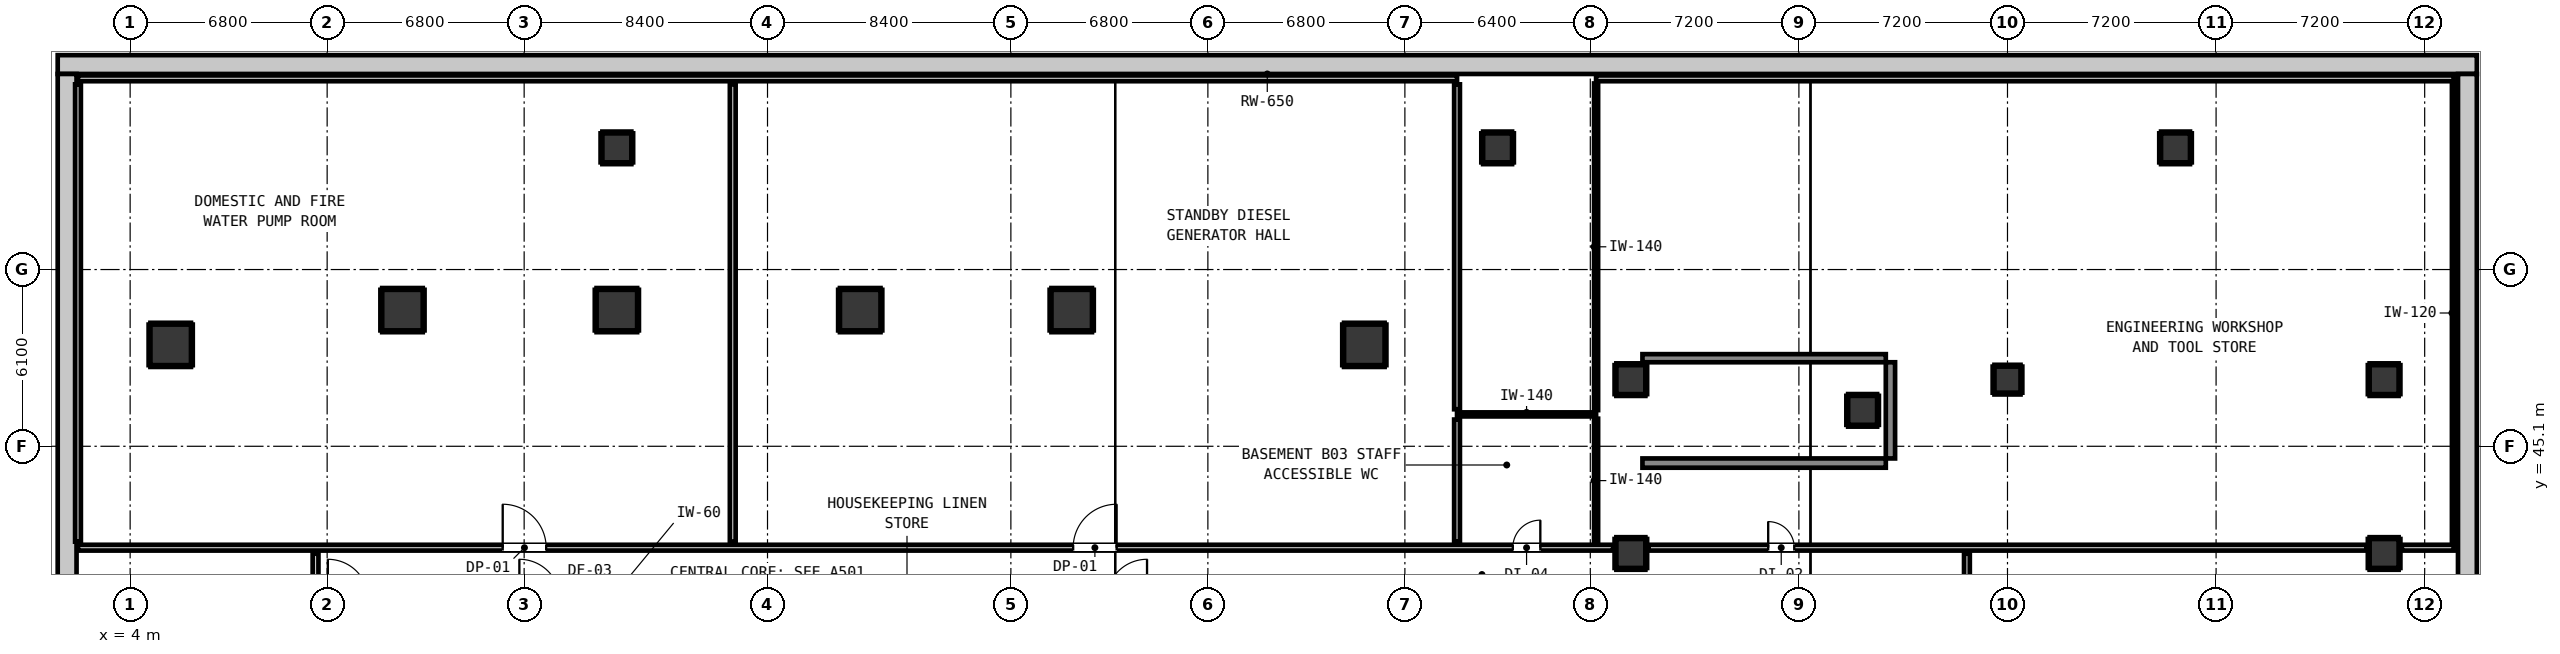
"""IFC4 building model, lengths in metres.
Left out: names, types, materials, properties, quantities, classifications, styles, units other than length and angle.
Written with IfcOpenShell. Run it as: python <this file> out.ifc"""

import sys

from ifc_helpers import new_model, si_unit, direction, frame, frame_2d, origin, origin_2d, place, context, subcontext, project, spatial, rectangle, circle, extrude, element, fill, save


model = new_model("IFC4")
c1 = context("Model", 3, precision=1e-05, world=origin(), true_north=direction((0.0, 1.0)))
c2 = subcontext(c1, "Body", "Model", "MODEL_VIEW")
j1 = project(units=[si_unit("LENGTHUNIT", "METRE"), si_unit("PLANEANGLEUNIT", "RADIAN")], contexts=[c1])
p1 = place(None, origin())
s1 = spatial("IfcSite", under=j1, at=p1, CompositionType="ELEMENT")
p2 = place(p1, origin())
s2 = spatial("IfcBuilding", under=s1, at=p2, CompositionType="ELEMENT")
p3 = place(p2, frame((0.0, 0.0, -13.2)))
s3 = spatial("IfcBuildingStorey", under=s2, at=p3, CompositionType="ELEMENT", Elevation=-13.2)
p4 = place(p3, frame((85.0, 58.275, 0.0), z_axis=(0.0, 0.0, 1.0), x_axis=(-1.0, 0.0, 0.0)))
e1 = element("IfcWall", 1, at=p4, inside=s3, PredefinedType="SOLIDWALL", context=c2, shape_type="SweptSolid", body=[
    extrude(rectangle(XDim=83.5, YDim=0.65, at=frame_2d((41.75, 0.0))), origin(), (0.0, 0.0, 1.0), 4.4),
])
for number, where, z_axis, x_axis in (
    (2, (1.825, 57.95, 0.0), (0.0, 0.0, 1.0), (0.0, -1.0, 0.0)),
    (3, (84.675, 2.65, 0.0), (0.0, 0.0, 1.0), (0.0, 1.0, 0.0)),
):
    element("IfcWall", number, at=place(p3, frame(where, z_axis=z_axis, x_axis=x_axis)), inside=s3, PredefinedType="SOLIDWALL", context=c2, shape_type="SweptSolid", body=[
        extrude(rectangle(XDim=55.3, YDim=0.65, at=frame_2d((27.65, 0.0))), origin(), (0.0, 0.0, 1.0), 4.4),
    ])
p5 = place(p3, frame((64.76, 44.68, 0.0), z_axis=(0.0, 0.0, 1.0), x_axis=(0.0, 1.0, 0.0)))
e4 = element("IfcWall", 4, at=p5, inside=s3, PredefinedType="SHEAR", context=c2, shape_type="SweptSolid", body=[
    extrude(rectangle(XDim=3.32, YDim=0.32, at=frame_2d((1.66, 0.0))), origin(), (0.0, 0.0, 1.0), 4.4),
])
p6 = place(p3, frame((56.2, 48.14, 0.0), z_axis=(0.0, 0.0, 1.0), x_axis=(1.0, 0.0, 0.0)))
e5 = element("IfcWall", 5, at=p6, inside=s3, PredefinedType="SHEAR", context=c2, shape_type="SweptSolid", body=[
    extrude(rectangle(XDim=8.4, YDim=0.28, at=frame_2d((4.2, 0.0))), origin(), (0.0, 0.0, 1.0), 4.4),
])
p7 = place(p3, frame((56.2, 44.52, 0.0), z_axis=(0.0, 0.0, 1.0), x_axis=(1.0, 0.0, 0.0)))
e6 = element("IfcWall", 6, at=p7, inside=s3, PredefinedType="SHEAR", context=c2, shape_type="SweptSolid", body=[
    extrude(rectangle(XDim=8.4, YDim=0.32, at=frame_2d((4.2, 0.0))), origin(), (0.0, 0.0, 1.0), 4.4),
])
for number, where, z_axis, x_axis in (
    (7, (13.4, 49.8, -0.4), (0.0, 0.0, 1.0), (1.0, 0.0, 0.0)),
    (8, (20.8, 49.8, -0.4), (0.0, 0.0, 1.0), (1.0, 0.0, 0.0)),
    (9, (29.2, 49.8, -0.4), (0.0, 0.0, 1.0), (1.0, 0.0, 0.0)),
    (10, (36.5, 49.8, -0.4), (0.0, 0.0, 1.0), (1.0, 0.0, 0.0)),
    (11, (5.4, 48.6, -0.4), (0.0, 0.0, 1.0), (1.0, 0.0, 0.0)),
    (12, (46.6, 48.6, -0.4), (0.0, 0.0, 1.0), (1.0, 0.0, 0.0)),
):
    element("IfcColumn", number, at=place(p3, frame(where, z_axis=z_axis, x_axis=x_axis)), inside=s3, PredefinedType="COLUMN", context=c2, shape_type="SweptSolid", body=[
        extrude(rectangle(XDim=1.4, YDim=1.4, at=origin_2d()), origin(), (0.0, 0.0, 1.0), 4.8),
    ])
for number, where, z_axis, x_axis in (
    (13, (20.8, 55.4, -0.4), (0.0, 0.0, 1.0), (1.0, 0.0, 0.0)),
    (14, (51.2, 55.4, -0.4), (0.0, 0.0, 1.0), (1.0, 0.0, 0.0)),
    (15, (74.6, 55.4, -0.4), (0.0, 0.0, 1.0), (1.0, 0.0, 0.0)),
    (16, (63.8, 46.34, -0.4), (0.0, 0.0, 1.0), (1.0, 0.0, 0.0)),
    (17, (55.8, 41.4, -0.4), (0.0, 0.0, 1.0), (1.0, 0.0, 0.0)),
    (18, (55.8, 47.4, -0.4), (0.0, 0.0, 1.0), (1.0, 0.0, 0.0)),
    (19, (81.8, 41.4, -0.4), (0.0, 0.0, 1.0), (1.0, 0.0, 0.0)),
    (20, (81.8, 47.4, -0.4), (0.0, 0.0, 1.0), (1.0, 0.0, 0.0)),
):
    element("IfcColumn", number, at=place(p3, frame(where, z_axis=z_axis, x_axis=x_axis)), inside=s3, PredefinedType="COLUMN", context=c2, shape_type="SweptSolid", body=[
        extrude(rectangle(XDim=1.0, YDim=1.0, at=origin_2d()), origin(), (0.0, 0.0, 1.0), 4.8),
    ])
p8 = place(p3, frame((68.8, 47.4, -0.4), z_axis=(0.0, 0.0, 1.0), x_axis=(1.0, 0.0, 0.0)))
e21 = element("IfcColumn", 21, at=p8, inside=s3, PredefinedType="COLUMN", context=c2, shape_type="SweptSolid", body=[
    extrude(circle(Radius=0.45, at=origin_2d()), origin(), (0.0, 0.0, 1.0), 4.8),
])
p9 = place(p3, frame((2.2, 41.6, 0.0), z_axis=(0.0, 0.0, 1.0), x_axis=(1.0, 0.0, 0.0)))
e22 = element("IfcWall", 22, at=p9, inside=s3, PredefinedType="PARTITIONING", context=c2, shape_type="SweptSolid", body=[
    extrude(rectangle(XDim=52.988, YDim=0.2, at=frame_2d((26.494, 0.0))), origin(), (0.0, 0.0, 1.0), 4.1),
])
p10 = place(p9, frame((14.66, 0.0, 0.0)))
e23 = element("IfcOpeningElement", 23, at=p10, cuts=e22, PredefinedType="OPENING", context=c2, shape_type="SweptSolid", body=[
    extrude(rectangle(XDim=1.5, YDim=2.15, at=frame_2d((0.75, 1.075))), frame((0.0, 0.11, 0.0), z_axis=(0.0, -1.0, 0.0), x_axis=(1.0, 0.0, 0.0)), (0.0, 0.0, 1.0), 0.22),
])
p11 = place(p9, frame((34.35, 0.0, 0.0)))
e24 = element("IfcOpeningElement", 24, at=p11, cuts=e22, PredefinedType="OPENING", context=c2, shape_type="SweptSolid", body=[
    extrude(rectangle(XDim=1.5, YDim=2.15, at=frame_2d((0.75, 1.075))), frame((0.0, 0.11, 0.0), z_axis=(0.0, -1.0, 0.0), x_axis=(1.0, 0.0, 0.0)), (0.0, 0.0, 1.0), 0.22),
])
p12 = place(p9, frame((49.525, 0.0, 0.0)))
e25 = element("IfcOpeningElement", 25, at=p12, cuts=e22, PredefinedType="OPENING", context=c2, shape_type="SweptSolid", body=[
    extrude(rectangle(XDim=0.95, YDim=2.1, at=frame_2d((0.475, 1.05))), frame((0.0, 0.11, 0.0), z_axis=(0.0, -1.0, 0.0), x_axis=(1.0, 0.0, 0.0)), (0.0, 0.0, 1.0), 0.22),
])
p13 = place(p3, frame((56.412, 41.6, 0.0), z_axis=(0.0, 0.0, 1.0), x_axis=(1.0, 0.0, 0.0)))
e26 = element("IfcWall", 26, at=p13, inside=s3, PredefinedType="PARTITIONING", context=c2, shape_type="SweptSolid", body=[
    extrude(rectangle(XDim=24.776, YDim=0.2, at=frame_2d((12.388, 0.0))), origin(), (0.0, 0.0, 1.0), 4.1),
])
p14 = place(p13, frame((4.128, 0.0, 0.0)))
e27 = element("IfcOpeningElement", 27, at=p14, cuts=e26, PredefinedType="OPENING", context=c2, shape_type="SweptSolid", body=[
    extrude(rectangle(XDim=0.9, YDim=2.1, at=frame_2d((0.45, 1.05))), frame((0.0, 0.11, 0.0), z_axis=(0.0, -1.0, 0.0), x_axis=(1.0, 0.0, 0.0)), (0.0, 0.0, 1.0), 0.22),
])
p15 = place(p3, frame((82.412, 41.6, 0.0), z_axis=(0.0, 0.0, 1.0), x_axis=(1.0, 0.0, 0.0)))
e28 = element("IfcWall", 28, at=p15, inside=s3, PredefinedType="PARTITIONING", context=c2, shape_type="SweptSolid", body=[
    extrude(rectangle(XDim=1.788, YDim=0.2, at=frame_2d((0.894, 0.0))), origin(), (0.0, 0.0, 1.0), 4.1),
])
p16 = place(p3, frame((2.2, 57.8, 0.0), z_axis=(0.0, 0.0, 1.0), x_axis=(1.0, 0.0, 0.0)))
e29 = element("IfcWall", 29, at=p16, inside=s3, PredefinedType="PARTITIONING", context=c2, shape_type="SweptSolid", body=[
    extrude(rectangle(XDim=47.6, YDim=0.2, at=frame_2d((23.8, 0.0))), origin(), (0.0, 0.0, 1.0), 4.1),
])
p17 = place(p3, frame((54.6, 57.8, 0.0), z_axis=(0.0, 0.0, 1.0), x_axis=(1.0, 0.0, 0.0)))
e30 = element("IfcWall", 30, at=p17, inside=s3, PredefinedType="PARTITIONING", context=c2, shape_type="SweptSolid", body=[
    extrude(rectangle(XDim=29.6, YDim=0.2, at=frame_2d((14.8, 0.0))), origin(), (0.0, 0.0, 1.0), 4.1),
])
p18 = place(p3, frame((49.8, 46.2, 0.0), z_axis=(0.0, 0.0, 1.0), x_axis=(1.0, 0.0, 0.0)))
e31 = element("IfcWall", 31, at=p18, inside=s3, PredefinedType="PARTITIONING", context=c2, shape_type="SweptSolid", body=[
    extrude(rectangle(XDim=4.8, YDim=0.14, at=frame_2d((2.4, 0.0))), origin(), (0.0, 0.0, 1.0), 4.1),
])
p19 = place(p3, frame((2.2, 41.808, 0.0), z_axis=(0.0, 0.0, 1.0), x_axis=(0.0, 1.0, 0.0)))
e32 = element("IfcWall", 32, at=p19, inside=s3, PredefinedType="PARTITIONING", context=c2, shape_type="SweptSolid", body=[
    extrude(rectangle(XDim=15.784, YDim=0.2, at=frame_2d((7.892, 0.0))), origin(), (0.0, 0.0, 1.0), 4.1),
])
p20 = place(p3, frame((10.4, 40.008, 0.0), z_axis=(0.0, 0.0, 1.0), x_axis=(0.0, 1.0, 0.0)))
e33 = element("IfcWall", 33, at=p20, inside=s3, PredefinedType="PARTITIONING", context=c2, shape_type="SweptSolid", body=[
    extrude(rectangle(XDim=1.384, YDim=0.2, at=frame_2d((0.692, 0.0))), origin(), (0.0, 0.0, 1.0), 4.1),
])
p21 = place(p3, frame((24.8, 41.808, 0.0), z_axis=(0.0, 0.0, 1.0), x_axis=(0.0, 1.0, 0.0)))
e34 = element("IfcWall", 34, at=p21, inside=s3, PredefinedType="PARTITIONING", context=c2, shape_type="SweptSolid", body=[
    extrude(rectangle(XDim=15.784, YDim=0.2, at=frame_2d((7.892, 0.0))), origin(), (0.0, 0.0, 1.0), 4.1),
])
p22 = place(p3, frame((49.8, 41.808, 0.0), z_axis=(0.0, 0.0, 1.0), x_axis=(0.0, 1.0, 0.0)))
e35 = element("IfcWall", 35, at=p22, inside=s3, PredefinedType="PARTITIONING", context=c2, shape_type="SweptSolid", body=[
    extrude(rectangle(XDim=4.214, YDim=0.2, at=frame_2d((2.107, 0.0))), origin(), (0.0, 0.0, 1.0), 4.1),
])
p23 = place(p3, frame((49.8, 46.378, 0.0), z_axis=(0.0, 0.0, 1.0), x_axis=(0.0, 1.0, 0.0)))
e36 = element("IfcWall", 36, at=p23, inside=s3, PredefinedType="PARTITIONING", context=c2, shape_type="SweptSolid", body=[
    extrude(rectangle(XDim=11.214, YDim=0.2, at=frame_2d((5.607, 0.0))), origin(), (0.0, 0.0, 1.0), 4.1),
])
p24 = place(p3, frame((67.4, 40.008, 0.0), z_axis=(0.0, 0.0, 1.0), x_axis=(0.0, 1.0, 0.0)))
e37 = element("IfcWall", 37, at=p24, inside=s3, PredefinedType="PARTITIONING", context=c2, shape_type="SweptSolid", body=[
    extrude(rectangle(XDim=1.384, YDim=0.2, at=frame_2d((0.692, 0.0))), origin(), (0.0, 0.0, 1.0), 4.1),
])
p25 = place(p3, frame((54.6, 41.778, 0.0), z_axis=(0.0, 0.0, 1.0), x_axis=(0.0, 1.0, 0.0)))
e38 = element("IfcWall", 38, at=p25, inside=s3, PredefinedType="PARTITIONING", context=c2, shape_type="SweptSolid", body=[
    extrude(rectangle(XDim=4.274, YDim=0.14, at=frame_2d((2.137, 0.0))), origin(), (0.0, 0.0, 1.0), 4.1),
])
p26 = place(p3, frame((54.6, 46.348, 0.0), z_axis=(0.0, 0.0, 1.0), x_axis=(0.0, 1.0, 0.0)))
e39 = element("IfcWall", 39, at=p26, inside=s3, PredefinedType="PARTITIONING", context=c2, shape_type="SweptSolid", body=[
    extrude(rectangle(XDim=11.274, YDim=0.14, at=frame_2d((5.637, 0.0))), origin(), (0.0, 0.0, 1.0), 4.1),
])
p27 = place(p3, frame((84.2, 41.768, 0.0), z_axis=(0.0, 0.0, 1.0), x_axis=(0.0, 1.0, 0.0)))
e40 = element("IfcWall", 40, at=p27, inside=s3, PredefinedType="PARTITIONING", context=c2, shape_type="SweptSolid", body=[
    extrude(rectangle(XDim=15.864, YDim=0.12, at=frame_2d((7.932, 0.0))), origin(), (0.0, 0.0, 1.0), 4.1),
])
for number, where, z_axis, x_axis in (
    (41, (12.7, 49.068, 0.0), (0.0, 0.0, 1.0), (1.0, 0.0, 0.0)),
    (42, (12.7, 50.532, 0.0), (0.0, 0.0, 1.0), (1.0, 0.0, 0.0)),
):
    element("IfcWall", number, at=place(p3, frame(where, z_axis=z_axis, x_axis=x_axis)), inside=s3, PredefinedType="PARTITIONING", context=c2, shape_type="SweptSolid", body=[
        extrude(rectangle(XDim=1.4, YDim=0.06, at=frame_2d((0.7, 0.0))), origin(), (0.0, 0.0, 1.0), 1.45),
    ])
for number, where, z_axis, x_axis in (
    (43, (12.668, 49.1, 0.0), (0.0, 0.0, 1.0), (0.0, 1.0, 0.0)),
    (44, (14.132, 49.1, 0.0), (0.0, 0.0, 1.0), (0.0, 1.0, 0.0)),
    (45, (20.1, 49.068, 0.0), (0.0, 0.0, 1.0), (1.0, 0.0, 0.0)),
    (46, (20.1, 50.532, 0.0), (0.0, 0.0, 1.0), (1.0, 0.0, 0.0)),
    (47, (20.068, 49.1, 0.0), (0.0, 0.0, 1.0), (0.0, 1.0, 0.0)),
    (48, (21.532, 49.1, 0.0), (0.0, 0.0, 1.0), (0.0, 1.0, 0.0)),
    (49, (28.5, 49.068, 0.0), (0.0, 0.0, 1.0), (1.0, 0.0, 0.0)),
    (50, (28.5, 50.532, 0.0), (0.0, 0.0, 1.0), (1.0, 0.0, 0.0)),
    (51, (28.468, 49.1, 0.0), (0.0, 0.0, 1.0), (0.0, 1.0, 0.0)),
    (52, (29.932, 49.1, 0.0), (0.0, 0.0, 1.0), (0.0, 1.0, 0.0)),
    (53, (35.8, 49.068, 0.0), (0.0, 0.0, 1.0), (1.0, 0.0, 0.0)),
    (54, (35.8, 50.532, 0.0), (0.0, 0.0, 1.0), (1.0, 0.0, 0.0)),
    (55, (35.768, 49.1, 0.0), (0.0, 0.0, 1.0), (0.0, 1.0, 0.0)),
    (56, (37.232, 49.1, 0.0), (0.0, 0.0, 1.0), (0.0, 1.0, 0.0)),
):
    element("IfcWall", number, at=place(p3, frame(where, z_axis=z_axis, x_axis=x_axis)), inside=s3, PredefinedType="PARTITIONING", context=c2, shape_type="SweptSolid", body=[
        extrude(rectangle(XDim=1.4, YDim=0.06, at=frame_2d((0.7, 0.0))), origin(), (0.0, 0.0, 1.0), 1.45),
    ])
for number, where, z_axis, x_axis in (
    (57, (4.7, 47.868, 0.0), (0.0, 0.0, 1.0), (1.0, 0.0, 0.0)),
    (58, (4.7, 49.332, 0.0), (0.0, 0.0, 1.0), (1.0, 0.0, 0.0)),
    (59, (4.668, 47.9, 0.0), (0.0, 0.0, 1.0), (0.0, 1.0, 0.0)),
    (60, (6.132, 47.9, 0.0), (0.0, 0.0, 1.0), (0.0, 1.0, 0.0)),
    (61, (45.9, 47.868, 0.0), (0.0, 0.0, 1.0), (1.0, 0.0, 0.0)),
    (62, (45.9, 49.332, 0.0), (0.0, 0.0, 1.0), (1.0, 0.0, 0.0)),
    (63, (45.868, 47.9, 0.0), (0.0, 0.0, 1.0), (0.0, 1.0, 0.0)),
    (64, (47.332, 47.9, 0.0), (0.0, 0.0, 1.0), (0.0, 1.0, 0.0)),
):
    element("IfcWall", number, at=place(p3, frame(where, z_axis=z_axis, x_axis=x_axis)), inside=s3, PredefinedType="PARTITIONING", context=c2, shape_type="SweptSolid", body=[
        extrude(rectangle(XDim=1.4, YDim=0.06, at=frame_2d((0.7, 0.0))), origin(), (0.0, 0.0, 1.0), 1.45),
    ])
for number, where, z_axis, x_axis in (
    (65, (20.3, 54.868, 0.0), (0.0, 0.0, 1.0), (1.0, 0.0, 0.0)),
    (66, (20.3, 55.932, 0.0), (0.0, 0.0, 1.0), (1.0, 0.0, 0.0)),
    (67, (20.268, 54.9, 0.0), (0.0, 0.0, 1.0), (0.0, 1.0, 0.0)),
    (68, (21.332, 54.9, 0.0), (0.0, 0.0, 1.0), (0.0, 1.0, 0.0)),
    (69, (50.7, 54.868, 0.0), (0.0, 0.0, 1.0), (1.0, 0.0, 0.0)),
    (70, (50.7, 55.932, 0.0), (0.0, 0.0, 1.0), (1.0, 0.0, 0.0)),
    (71, (50.668, 54.9, 0.0), (0.0, 0.0, 1.0), (0.0, 1.0, 0.0)),
    (72, (51.732, 54.9, 0.0), (0.0, 0.0, 1.0), (0.0, 1.0, 0.0)),
    (73, (74.1, 54.868, 0.0), (0.0, 0.0, 1.0), (1.0, 0.0, 0.0)),
    (74, (74.1, 55.932, 0.0), (0.0, 0.0, 1.0), (1.0, 0.0, 0.0)),
    (75, (74.068, 54.9, 0.0), (0.0, 0.0, 1.0), (0.0, 1.0, 0.0)),
    (76, (75.132, 54.9, 0.0), (0.0, 0.0, 1.0), (0.0, 1.0, 0.0)),
    (77, (63.3, 45.808, 0.0), (0.0, 0.0, 1.0), (1.0, 0.0, 0.0)),
    (78, (63.3, 46.872, 0.0), (0.0, 0.0, 1.0), (1.0, 0.0, 0.0)),
    (79, (63.268, 45.84, 0.0), (0.0, 0.0, 1.0), (0.0, 1.0, 0.0)),
    (80, (64.332, 45.84, 0.0), (0.0, 0.0, 1.0), (0.0, 1.0, 0.0)),
    (81, (55.3, 40.868, 0.0), (0.0, 0.0, 1.0), (1.0, 0.0, 0.0)),
    (82, (55.3, 41.932, 0.0), (0.0, 0.0, 1.0), (1.0, 0.0, 0.0)),
    (83, (55.268, 40.9, 0.0), (0.0, 0.0, 1.0), (0.0, 1.0, 0.0)),
    (84, (56.332, 40.9, 0.0), (0.0, 0.0, 1.0), (0.0, 1.0, 0.0)),
    (85, (55.3, 46.868, 0.0), (0.0, 0.0, 1.0), (1.0, 0.0, 0.0)),
    (86, (55.3, 47.932, 0.0), (0.0, 0.0, 1.0), (1.0, 0.0, 0.0)),
    (87, (55.268, 46.9, 0.0), (0.0, 0.0, 1.0), (0.0, 1.0, 0.0)),
    (88, (56.332, 46.9, 0.0), (0.0, 0.0, 1.0), (0.0, 1.0, 0.0)),
    (89, (81.3, 40.868, 0.0), (0.0, 0.0, 1.0), (1.0, 0.0, 0.0)),
    (90, (81.3, 41.932, 0.0), (0.0, 0.0, 1.0), (1.0, 0.0, 0.0)),
    (91, (81.268, 40.9, 0.0), (0.0, 0.0, 1.0), (0.0, 1.0, 0.0)),
    (92, (82.332, 40.9, 0.0), (0.0, 0.0, 1.0), (0.0, 1.0, 0.0)),
    (93, (81.3, 46.868, 0.0), (0.0, 0.0, 1.0), (1.0, 0.0, 0.0)),
    (94, (81.3, 47.932, 0.0), (0.0, 0.0, 1.0), (1.0, 0.0, 0.0)),
    (95, (81.268, 46.9, 0.0), (0.0, 0.0, 1.0), (0.0, 1.0, 0.0)),
    (96, (82.332, 46.9, 0.0), (0.0, 0.0, 1.0), (0.0, 1.0, 0.0)),
):
    element("IfcWall", number, at=place(p3, frame(where, z_axis=z_axis, x_axis=x_axis)), inside=s3, PredefinedType="PARTITIONING", context=c2, shape_type="SweptSolid", body=[
        extrude(rectangle(XDim=1.0, YDim=0.06, at=frame_2d((0.5, 0.0))), origin(), (0.0, 0.0, 1.0), 1.45),
    ])
for number, where, z_axis, x_axis in (
    (97, (68.35, 46.918, 0.0), (0.0, 0.0, 1.0), (1.0, 0.0, 0.0)),
    (98, (68.35, 47.882, 0.0), (0.0, 0.0, 1.0), (1.0, 0.0, 0.0)),
):
    element("IfcWall", number, at=place(p3, frame(where, z_axis=z_axis, x_axis=x_axis)), inside=s3, PredefinedType="PARTITIONING", context=c2, shape_type="SweptSolid", body=[
        extrude(rectangle(XDim=0.9, YDim=0.06, at=frame_2d((0.45, 0.0))), origin(), (0.0, 0.0, 1.0), 1.45),
    ])
for number, where, z_axis, x_axis in (
    (99, (68.318, 46.95, 0.0), (0.0, 0.0, 1.0), (0.0, 1.0, 0.0)),
    (100, (69.282, 46.95, 0.0), (0.0, 0.0, 1.0), (0.0, 1.0, 0.0)),
):
    element("IfcWall", number, at=place(p3, frame(where, z_axis=z_axis, x_axis=x_axis)), inside=s3, PredefinedType="PARTITIONING", context=c2, shape_type="SweptSolid", body=[
        extrude(rectangle(XDim=0.9, YDim=0.06, at=frame_2d((0.45, 0.0))), origin(), (0.0, 0.0, 1.0), 1.45),
    ])
p28 = place(p10, origin())
e101 = element("IfcDoor", 101, at=p28, inside=s3, OperationType="SINGLE_SWING_LEFT", PredefinedType="DOOR", context=c2, shape_type="SweptSolid", body=[
    extrude(rectangle(XDim=1.5, YDim=2.15, at=frame_2d((0.75, 1.075))), frame((0.0, 0.025, 0.0), z_axis=(0.0, -1.0, 0.0), x_axis=(1.0, 0.0, 0.0)), (0.0, 0.0, 1.0), 0.05),
])
fill(e23, e101)
p29 = place(p11, origin())
e102 = element("IfcDoor", 102, at=p29, inside=s3, OperationType="SINGLE_SWING_RIGHT", PredefinedType="DOOR", context=c2, shape_type="SweptSolid", body=[
    extrude(rectangle(XDim=1.5, YDim=2.15, at=frame_2d((0.75, 1.075))), frame((0.0, 0.025, 0.0), z_axis=(0.0, -1.0, 0.0), x_axis=(1.0, 0.0, 0.0)), (0.0, 0.0, 1.0), 0.05),
])
fill(e24, e102)
p30 = place(p12, origin())
e103 = element("IfcDoor", 103, at=p30, inside=s3, OperationType="SINGLE_SWING_RIGHT", PredefinedType="DOOR", context=c2, shape_type="SweptSolid", body=[
    extrude(rectangle(XDim=0.95, YDim=2.1, at=frame_2d((0.475, 1.05))), frame((0.0, 0.025, 0.0), z_axis=(0.0, -1.0, 0.0), x_axis=(1.0, 0.0, 0.0)), (0.0, 0.0, 1.0), 0.05),
])
fill(e25, e103)
p31 = place(p14, origin())
e104 = element("IfcDoor", 104, at=p31, inside=s3, OperationType="SINGLE_SWING_LEFT", PredefinedType="DOOR", context=c2, shape_type="SweptSolid", body=[
    extrude(rectangle(XDim=0.9, YDim=2.1, at=frame_2d((0.45, 1.05))), frame((0.0, 0.025, 0.0), z_axis=(0.0, -1.0, 0.0), x_axis=(1.0, 0.0, 0.0)), (0.0, 0.0, 1.0), 0.05),
])
fill(e27, e104)
save(model, sys.argv[1])
